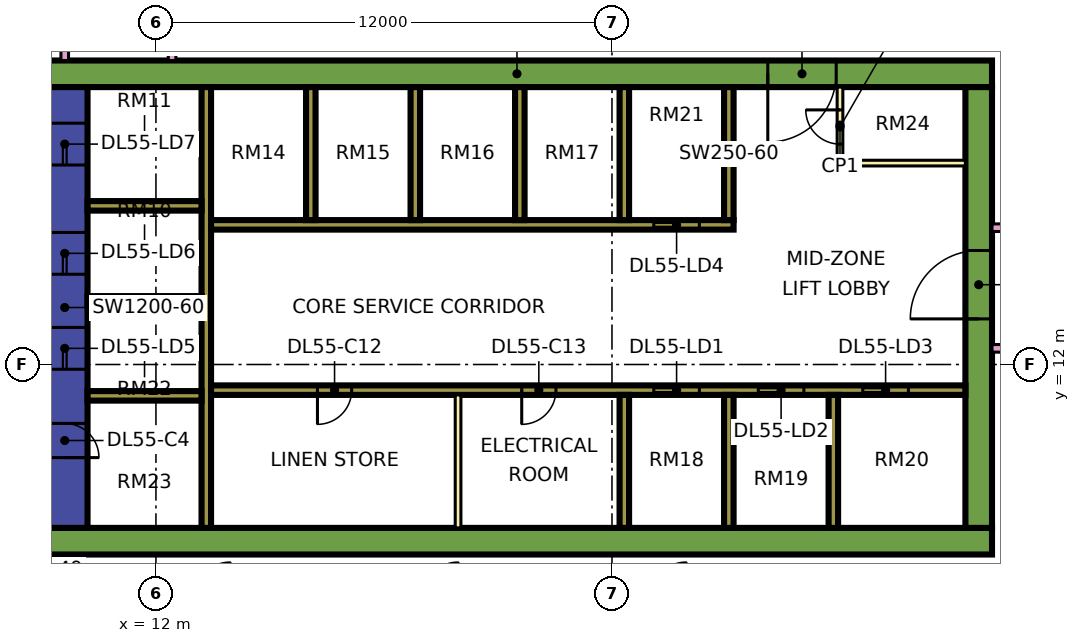
"""IFC4 building model, lengths in metres.
Left out: names, types, materials, properties, quantities, classifications, styles, units other than length and angle.
Written with IfcOpenShell. Run it as: python <this file> out.ifc"""

import sys

from ifc_helpers import new_model, si_unit, direction, frame, frame_2d, origin, place, context, subcontext, project, spatial, rectangle, extrude, element, fill, save


model = new_model("IFC4")
c1 = context("Model", 3, precision=1e-05, world=origin(), true_north=direction((0.0, 1.0)))
c2 = subcontext(c1, "Body", "Model", "MODEL_VIEW")
j1 = project(units=[si_unit("LENGTHUNIT", "METRE"), si_unit("PLANEANGLEUNIT", "RADIAN")], contexts=[c1])
p1 = place(None, origin())
s1 = spatial("IfcSite", under=j1, at=p1, CompositionType="ELEMENT")
p2 = place(p1, origin())
s2 = spatial("IfcBuilding", under=s1, at=p2, CompositionType="ELEMENT")
p3 = place(p2, frame((0.0, 0.0, 234.15)))
s3 = spatial("IfcBuildingStorey", under=s2, at=p3, CompositionType="ELEMENT", Elevation=234.15)
p4 = place(p3, frame((9.0, 7.35, 0.0), z_axis=(0.0, 0.0, 1.0), x_axis=(1.0, 0.0, 0.0)))
e1 = element("IfcWall", 1, at=p4, inside=s3, PredefinedType="SHEAR", context=c2, shape_type="SweptSolid", body=[
    extrude(rectangle(XDim=25.0, YDim=0.7, at=frame_2d((12.5, 0.0))), origin(), (0.0, 0.0, 1.0), 3.75),
])
p5 = place(p3, frame((9.0, 19.65, 0.0), z_axis=(0.0, 0.0, 1.0), x_axis=(1.0, 0.0, 0.0)))
e2 = element("IfcWall", 2, at=p5, inside=s3, PredefinedType="SHEAR", context=c2, shape_type="SweptSolid", body=[
    extrude(rectangle(XDim=25.0, YDim=0.7, at=frame_2d((12.5, 0.0))), origin(), (0.0, 0.0, 1.0), 3.75),
])
p6 = place(p5, frame((19.1, 0.0, 0.0)))
e3 = element("IfcOpeningElement", 3, at=p6, cuts=e2, PredefinedType="OPENING", context=c2, shape_type="SweptSolid", body=[
    extrude(rectangle(XDim=1.8, YDim=2.4, at=frame_2d((0.9, 1.2))), frame((0.0, 0.36, 0.0), z_axis=(0.0, -1.0, 0.0), x_axis=(1.0, 0.0, 0.0)), (0.0, 0.0, 1.0), 0.72),
])
p7 = place(p3, frame((9.6, 7.7, 0.0), z_axis=(0.0, 0.0, 1.0), x_axis=(0.0, 1.0, 0.0)))
e4 = element("IfcWall", 4, at=p7, inside=s3, PredefinedType="SHEAR", context=c2, shape_type="SweptSolid", body=[
    extrude(rectangle(XDim=11.6, YDim=1.2, at=frame_2d((5.8, 0.0))), origin(), (0.0, 0.0, 1.0), 3.75),
])
p8 = place(p7, frame((4.175, 0.0, 0.0)))
e5 = element("IfcOpeningElement", 5, at=p8, cuts=e4, PredefinedType="OPENING", context=c2, shape_type="SweptSolid", body=[
    extrude(rectangle(XDim=1.1, YDim=2.2, at=frame_2d((0.55, 1.1))), frame((0.0, 0.61, 0.0), z_axis=(0.0, -1.0, 0.0), x_axis=(1.0, 0.0, 0.0)), (0.0, 0.0, 1.0), 1.22),
])
p9 = place(p7, frame((6.675, 0.0, 0.0)))
e6 = element("IfcOpeningElement", 6, at=p9, cuts=e4, PredefinedType="OPENING", context=c2, shape_type="SweptSolid", body=[
    extrude(rectangle(XDim=1.1, YDim=2.2, at=frame_2d((0.55, 1.1))), frame((0.0, 0.61, 0.0), z_axis=(0.0, -1.0, 0.0), x_axis=(1.0, 0.0, 0.0)), (0.0, 0.0, 1.0), 1.22),
])
p10 = place(p7, frame((9.55, 0.0, 0.0)))
e7 = element("IfcOpeningElement", 7, at=p10, cuts=e4, PredefinedType="OPENING", context=c2, shape_type="SweptSolid", body=[
    extrude(rectangle(XDim=1.1, YDim=2.2, at=frame_2d((0.55, 1.1))), frame((0.0, 0.61, 0.0), z_axis=(0.0, -1.0, 0.0), x_axis=(1.0, 0.0, 0.0)), (0.0, 0.0, 1.0), 1.22),
])
p11 = place(p7, frame((1.85, 0.0, 0.0)))
e8 = element("IfcOpeningElement", 8, at=p11, cuts=e4, PredefinedType="OPENING", context=c2, shape_type="SweptSolid", body=[
    extrude(rectangle(XDim=0.9, YDim=2.1, at=frame_2d((0.45, 1.05))), frame((0.0, 0.61, 0.0), z_axis=(0.0, -1.0, 0.0), x_axis=(1.0, 0.0, 0.0)), (0.0, 0.0, 1.0), 1.22),
])
p12 = place(p3, frame((33.65, 7.7, 0.0), z_axis=(0.0, 0.0, 1.0), x_axis=(0.0, 1.0, 0.0)))
e9 = element("IfcWall", 9, at=p12, inside=s3, PredefinedType="SHEAR", context=c2, shape_type="SweptSolid", body=[
    extrude(rectangle(XDim=11.6, YDim=0.7, at=frame_2d((5.8, 0.0))), origin(), (0.0, 0.0, 1.0), 3.75),
])
p13 = place(p12, frame((5.5, 0.0, 0.0)))
e10 = element("IfcOpeningElement", 10, at=p13, cuts=e9, PredefinedType="OPENING", context=c2, shape_type="SweptSolid", body=[
    extrude(rectangle(XDim=1.8, YDim=2.4, at=frame_2d((0.9, 1.2))), frame((0.0, 0.36, 0.0), z_axis=(0.0, -1.0, 0.0), x_axis=(1.0, 0.0, 0.0)), (0.0, 0.0, 1.0), 0.72),
])
p14 = place(p3, frame((13.325, 7.7, 0.0), z_axis=(0.0, 0.0, 1.0), x_axis=(0.0, 1.0, 0.0)))
e11 = element("IfcWall", 11, at=p14, inside=s3, PredefinedType="SHEAR", context=c2, shape_type="SweptSolid", body=[
    extrude(rectangle(XDim=11.6, YDim=0.25, at=frame_2d((5.8, 0.0))), origin(), (0.0, 0.0, 1.0), 3.75),
])
p15 = place(p3, frame((13.45, 11.325, 0.0), z_axis=(0.0, 0.0, 1.0), x_axis=(1.0, 0.0, 0.0)))
e12 = element("IfcWall", 12, at=p15, inside=s3, PredefinedType="SHEAR", context=c2, shape_type="SweptSolid", body=[
    extrude(rectangle(XDim=19.85, YDim=0.25, at=frame_2d((9.925, 0.0))), origin(), (0.0, 0.0, 1.0), 3.75),
])
p16 = place(p15, frame((11.65, 0.0, 0.0)))
e13 = element("IfcOpeningElement", 13, at=p16, cuts=e12, PredefinedType="OPENING", context=c2, shape_type="SweptSolid", body=[
    extrude(rectangle(XDim=1.2, YDim=2.2, at=frame_2d((0.6, 1.1))), frame((0.0, 0.135, 0.0), z_axis=(0.0, -1.0, 0.0), x_axis=(1.0, 0.0, 0.0)), (0.0, 0.0, 1.0), 0.27),
])
p17 = place(p15, frame((14.4, 0.0, 0.0)))
e14 = element("IfcOpeningElement", 14, at=p17, cuts=e12, PredefinedType="OPENING", context=c2, shape_type="SweptSolid", body=[
    extrude(rectangle(XDim=1.2, YDim=2.2, at=frame_2d((0.6, 1.1))), frame((0.0, 0.135, 0.0), z_axis=(0.0, -1.0, 0.0), x_axis=(1.0, 0.0, 0.0)), (0.0, 0.0, 1.0), 0.27),
])
p18 = place(p15, frame((17.15, 0.0, 0.0)))
e15 = element("IfcOpeningElement", 15, at=p18, cuts=e12, PredefinedType="OPENING", context=c2, shape_type="SweptSolid", body=[
    extrude(rectangle(XDim=1.2, YDim=2.2, at=frame_2d((0.6, 1.1))), frame((0.0, 0.135, 0.0), z_axis=(0.0, -1.0, 0.0), x_axis=(1.0, 0.0, 0.0)), (0.0, 0.0, 1.0), 0.27),
])
p19 = place(p15, frame((2.8, 0.0, 0.0)))
e16 = element("IfcOpeningElement", 16, at=p19, cuts=e12, PredefinedType="OPENING", context=c2, shape_type="SweptSolid", body=[
    extrude(rectangle(XDim=0.9, YDim=2.1, at=frame_2d((0.45, 1.05))), frame((0.0, 0.135, 0.0), z_axis=(0.0, -1.0, 0.0), x_axis=(1.0, 0.0, 0.0)), (0.0, 0.0, 1.0), 0.27),
])
p20 = place(p15, frame((8.175, 0.0, 0.0)))
e17 = element("IfcOpeningElement", 17, at=p20, cuts=e12, PredefinedType="OPENING", context=c2, shape_type="SweptSolid", body=[
    extrude(rectangle(XDim=0.9, YDim=2.1, at=frame_2d((0.45, 1.05))), frame((0.0, 0.135, 0.0), z_axis=(0.0, -1.0, 0.0), x_axis=(1.0, 0.0, 0.0)), (0.0, 0.0, 1.0), 0.27),
])
p21 = place(p3, frame((13.45, 15.675, 0.0), z_axis=(0.0, 0.0, 1.0), x_axis=(1.0, 0.0, 0.0)))
e18 = element("IfcWall", 18, at=p21, inside=s3, PredefinedType="SHEAR", context=c2, shape_type="SweptSolid", body=[
    extrude(rectangle(XDim=13.75, YDim=0.25, at=frame_2d((6.875, 0.0))), origin(), (0.0, 0.0, 1.0), 3.75),
])
p22 = place(p21, frame((11.65, 0.0, 0.0)))
e19 = element("IfcOpeningElement", 19, at=p22, cuts=e18, PredefinedType="OPENING", context=c2, shape_type="SweptSolid", body=[
    extrude(rectangle(XDim=1.2, YDim=2.2, at=frame_2d((0.6, 1.1))), frame((0.0, 0.135, 0.0), z_axis=(0.0, -1.0, 0.0), x_axis=(1.0, 0.0, 0.0)), (0.0, 0.0, 1.0), 0.27),
])
for number, where, z_axis, x_axis in (
    (20, (10.2, 11.175, 0.0), (0.0, 0.0, 1.0), (1.0, 0.0, 0.0)),
    (21, (10.2, 13.675, 0.0), (0.0, 0.0, 1.0), (1.0, 0.0, 0.0)),
    (22, (10.2, 16.175, 0.0), (0.0, 0.0, 1.0), (1.0, 0.0, 0.0)),
):
    element("IfcWall", number, at=place(p3, frame(where, z_axis=z_axis, x_axis=x_axis)), inside=s3, PredefinedType="SHEAR", context=c2, shape_type="SweptSolid", body=[
        extrude(rectangle(XDim=3.0, YDim=0.25, at=frame_2d((1.5, 0.0))), origin(), (0.0, 0.0, 1.0), 3.75),
    ])
for number, where, z_axis, x_axis in (
    (23, (24.325, 7.7, 0.0), (0.0, 0.0, 1.0), (0.0, 1.0, 0.0)),
    (24, (27.075, 7.7, 0.0), (0.0, 0.0, 1.0), (0.0, 1.0, 0.0)),
    (25, (29.825, 7.7, 0.0), (0.0, 0.0, 1.0), (0.0, 1.0, 0.0)),
    (26, (16.075, 15.8, 0.0), (0.0, 0.0, 1.0), (0.0, 1.0, 0.0)),
    (27, (18.825, 15.8, 0.0), (0.0, 0.0, 1.0), (0.0, 1.0, 0.0)),
    (28, (21.575, 15.8, 0.0), (0.0, 0.0, 1.0), (0.0, 1.0, 0.0)),
    (29, (24.325, 15.8, 0.0), (0.0, 0.0, 1.0), (0.0, 1.0, 0.0)),
    (30, (27.075, 15.8, 0.0), (0.0, 0.0, 1.0), (0.0, 1.0, 0.0)),
):
    element("IfcWall", number, at=place(p3, frame(where, z_axis=z_axis, x_axis=x_axis)), inside=s3, PredefinedType="SHEAR", context=c2, shape_type="SweptSolid", body=[
        extrude(rectangle(XDim=3.5, YDim=0.25, at=frame_2d((1.75, 0.0))), origin(), (0.0, 0.0, 1.0), 3.75),
    ])
p23 = place(p3, frame((-1.447, 12.553, 0.0), z_axis=(0.0, 0.0, 1.0), x_axis=(0.707106781187, -0.707106781187, 0.0)))
e31 = element("IfcWall", 31, at=p23, inside=s3, PredefinedType="SOLIDWALL", context=c2, shape_type="SweptSolid", body=[
    extrude(rectangle(XDim=19.799, YDim=0.15, at=frame_2d((9.899, 0.0))), origin(), (0.0, 0.0, 1.0), 3.35),
])
p24 = place(p23, frame((2.212, 0.0, 0.45)))
e32 = element("IfcOpeningElement", 32, at=p24, cuts=e31, PredefinedType="OPENING", context=c2, shape_type="SweptSolid", body=[
    extrude(rectangle(XDim=3.0, YDim=2.4, at=frame_2d((1.5, 1.2))), frame((0.0, 0.085, 0.0), z_axis=(0.0, -1.0, 0.0), x_axis=(1.0, 0.0, 0.0)), (0.0, 0.0, 1.0), 0.17),
])
p25 = place(p23, frame((10.216, 0.0, 0.45)))
e33 = element("IfcOpeningElement", 33, at=p25, cuts=e31, PredefinedType="OPENING", context=c2, shape_type="SweptSolid", body=[
    extrude(rectangle(XDim=3.0, YDim=2.4, at=frame_2d((1.5, 1.2))), frame((0.0, 0.085, 0.0), z_axis=(0.0, -1.0, 0.0), x_axis=(1.0, 0.0, 0.0)), (0.0, 0.0, 1.0), 0.17),
])
p26 = place(p3, frame((19.95, 7.7, 0.0), z_axis=(0.0, 0.0, 1.0), x_axis=(0.0, 1.0, 0.0)))
e34 = element("IfcWall", 34, at=p26, inside=s3, PredefinedType="PARTITIONING", context=c2, shape_type="SweptSolid", body=[
    extrude(rectangle(XDim=3.5, YDim=0.15, at=frame_2d((1.75, 0.0))), origin(), (0.0, 0.0, 1.0), 3.35),
])
p27 = place(p3, frame((30.0, 17.3, 0.0), z_axis=(0.0, 0.0, 1.0), x_axis=(0.0, 1.0, 0.0)))
e35 = element("IfcWall", 35, at=p27, inside=s3, PredefinedType="PARTITIONING", context=c2, shape_type="SweptSolid", body=[
    extrude(rectangle(XDim=2.0, YDim=0.15, at=frame_2d((1.0, 0.0))), origin(), (0.0, 0.0, 1.0), 3.35),
])
p28 = place(p27, frame((0.5, 0.0, 0.0)))
e36 = element("IfcOpeningElement", 36, at=p28, cuts=e35, PredefinedType="OPENING", context=c2, shape_type="SweptSolid", body=[
    extrude(rectangle(XDim=0.9, YDim=2.1, at=frame_2d((0.45, 1.05))), frame((0.0, 0.085, 0.0), z_axis=(0.0, -1.0, 0.0), x_axis=(1.0, 0.0, 0.0)), (0.0, 0.0, 1.0), 0.17),
])
p29 = place(p3, frame((30.0, 17.3, 0.0), z_axis=(0.0, 0.0, 1.0), x_axis=(1.0, 0.0, 0.0)))
e37 = element("IfcWall", 37, at=p29, inside=s3, PredefinedType="PARTITIONING", context=c2, shape_type="SweptSolid", body=[
    extrude(rectangle(XDim=3.3, YDim=0.15, at=frame_2d((1.65, 0.0))), origin(), (0.0, 0.0, 1.0), 3.35),
])
p30 = place(p3, frame((9.6, 20.0, 0.0), z_axis=(0.0, 0.0, 1.0), x_axis=(0.0, 1.0, 0.0)))
e38 = element("IfcWall", 38, at=p30, inside=s3, PredefinedType="PARTITIONING", context=c2, shape_type="SweptSolid", body=[
    extrude(rectangle(XDim=42.926, YDim=0.2, at=frame_2d((21.463, 0.0))), origin(), (0.0, 0.0, 1.0), 3.35),
])
p31 = place(p30, frame((28.95, 0.0, 0.0)))
e39 = element("IfcOpeningElement", 39, at=p31, cuts=e38, PredefinedType="OPENING", context=c2, shape_type="SweptSolid", body=[
    extrude(rectangle(XDim=1.0, YDim=2.1, at=frame_2d((0.5, 1.05))), frame((0.0, 0.11, 0.0), z_axis=(0.0, -1.0, 0.0), x_axis=(1.0, 0.0, 0.0)), (0.0, 0.0, 1.0), 0.22),
])
p32 = place(p30, frame((31.95, 0.0, 0.0)))
e40 = element("IfcOpeningElement", 40, at=p32, cuts=e38, PredefinedType="OPENING", context=c2, shape_type="SweptSolid", body=[
    extrude(rectangle(XDim=1.0, YDim=2.1, at=frame_2d((0.5, 1.05))), frame((0.0, 0.11, 0.0), z_axis=(0.0, -1.0, 0.0), x_axis=(1.0, 0.0, 0.0)), (0.0, 0.0, 1.0), 0.22),
])
p33 = place(p30, frame((0.6, 0.0, 0.0)))
e41 = element("IfcOpeningElement", 41, at=p33, cuts=e38, PredefinedType="OPENING", context=c2, shape_type="SweptSolid", body=[
    extrude(rectangle(XDim=1.2, YDim=2.1, at=frame_2d((0.6, 1.05))), frame((0.0, 0.11, 0.0), z_axis=(0.0, -1.0, 0.0), x_axis=(1.0, 0.0, 0.0)), (0.0, 0.0, 1.0), 0.22),
])
p34 = place(p30, frame((11.25, 0.0, 0.0)))
e42 = element("IfcOpeningElement", 42, at=p34, cuts=e38, PredefinedType="OPENING", context=c2, shape_type="SweptSolid", body=[
    extrude(rectangle(XDim=1.0, YDim=2.1, at=frame_2d((0.5, 1.05))), frame((0.0, 0.11, 0.0), z_axis=(0.0, -1.0, 0.0), x_axis=(1.0, 0.0, 0.0)), (0.0, 0.0, 1.0), 0.22),
])
p35 = place(p3, frame((12.425, 20.0, 0.0), z_axis=(0.0, 0.0, 1.0), x_axis=(0.0, 1.0, 0.0)))
e43 = element("IfcWall", 43, at=p35, inside=s3, PredefinedType="PARTITIONING", context=c2, shape_type="SweptSolid", body=[
    extrude(rectangle(XDim=43.0, YDim=0.2, at=frame_2d((21.5, 0.0))), origin(), (0.0, 0.0, 1.0), 3.35),
])
p36 = place(p35, frame((5.95, 0.0, 0.0)))
e44 = element("IfcOpeningElement", 44, at=p36, cuts=e43, PredefinedType="OPENING", context=c2, shape_type="SweptSolid", body=[
    extrude(rectangle(XDim=1.0, YDim=2.1, at=frame_2d((0.5, 1.05))), frame((0.0, 0.11, 0.0), z_axis=(0.0, -1.0, 0.0), x_axis=(1.0, 0.0, 0.0)), (0.0, 0.0, 1.0), 0.22),
])
p37 = place(p35, frame((12.0, 0.0, 0.0)))
e45 = element("IfcOpeningElement", 45, at=p37, cuts=e43, PredefinedType="OPENING", context=c2, shape_type="SweptSolid", body=[
    extrude(rectangle(XDim=1.0, YDim=2.1, at=frame_2d((0.5, 1.05))), frame((0.0, 0.11, 0.0), z_axis=(0.0, -1.0, 0.0), x_axis=(1.0, 0.0, 0.0)), (0.0, 0.0, 1.0), 0.22),
])
p38 = place(p35, frame((16.9, 0.0, 0.0)))
e46 = element("IfcOpeningElement", 46, at=p38, cuts=e43, PredefinedType="OPENING", context=c2, shape_type="SweptSolid", body=[
    extrude(rectangle(XDim=1.0, YDim=2.1, at=frame_2d((0.5, 1.05))), frame((0.0, 0.11, 0.0), z_axis=(0.0, -1.0, 0.0), x_axis=(1.0, 0.0, 0.0)), (0.0, 0.0, 1.0), 0.22),
])
p39 = place(p35, frame((41.05, 0.0, 0.0)))
e47 = element("IfcOpeningElement", 47, at=p39, cuts=e43, PredefinedType="OPENING", context=c2, shape_type="SweptSolid", body=[
    extrude(rectangle(XDim=1.0, YDim=2.1, at=frame_2d((0.5, 1.05))), frame((0.0, 0.11, 0.0), z_axis=(0.0, -1.0, 0.0), x_axis=(1.0, 0.0, 0.0)), (0.0, 0.0, 1.0), 0.22),
])
p40 = place(p35, frame((1.15, 0.0, 0.0)))
e48 = element("IfcOpeningElement", 48, at=p40, cuts=e43, PredefinedType="OPENING", context=c2, shape_type="SweptSolid", body=[
    extrude(rectangle(XDim=1.8, YDim=2.1, at=frame_2d((0.9, 1.05))), frame((0.0, 0.11, 0.0), z_axis=(0.0, -1.0, 0.0), x_axis=(1.0, 0.0, 0.0)), (0.0, 0.0, 1.0), 0.22),
])
p41 = place(p35, frame((28.6, 0.0, 0.0)))
e49 = element("IfcOpeningElement", 49, at=p41, cuts=e43, PredefinedType="OPENING", context=c2, shape_type="SweptSolid", body=[
    extrude(rectangle(XDim=1.8, YDim=2.1, at=frame_2d((0.9, 1.05))), frame((0.0, 0.11, 0.0), z_axis=(0.0, -1.0, 0.0), x_axis=(1.0, 0.0, 0.0)), (0.0, 0.0, 1.0), 0.22),
])
p42 = place(p3, frame((34.0, 12.425, 0.0), z_axis=(0.0, 0.0, 1.0), x_axis=(1.0, 0.0, 0.0)))
e50 = element("IfcWall", 50, at=p42, inside=s3, PredefinedType="PARTITIONING", context=c2, shape_type="SweptSolid", body=[
    extrude(rectangle(XDim=2.426, YDim=0.2, at=frame_2d((1.213, 0.0))), origin(), (0.0, 0.0, 1.0), 3.35),
])
p43 = place(p3, frame((34.0, 15.6, 0.0), z_axis=(0.0, 0.0, 1.0), x_axis=(1.0, 0.0, 0.0)))
e51 = element("IfcWall", 51, at=p43, inside=s3, PredefinedType="PARTITIONING", context=c2, shape_type="SweptSolid", body=[
    extrude(rectangle(XDim=10.35, YDim=0.2, at=frame_2d((5.175, 0.0))), origin(), (0.0, 0.0, 1.0), 3.35),
])
p44 = place(p43, frame((5.6, 0.0, 0.0)))
e52 = element("IfcOpeningElement", 52, at=p44, cuts=e51, PredefinedType="OPENING", context=c2, shape_type="SweptSolid", body=[
    extrude(rectangle(XDim=1.0, YDim=2.1, at=frame_2d((0.5, 1.05))), frame((0.0, 0.11, 0.0), z_axis=(0.0, -1.0, 0.0), x_axis=(1.0, 0.0, 0.0)), (0.0, 0.0, 1.0), 0.22),
])
p45 = place(p43, frame((0.45, 0.0, 0.0)))
e53 = element("IfcOpeningElement", 53, at=p45, cuts=e51, PredefinedType="OPENING", context=c2, shape_type="SweptSolid", body=[
    extrude(rectangle(XDim=1.2, YDim=2.1, at=frame_2d((0.6, 1.05))), frame((0.0, 0.11, 0.0), z_axis=(0.0, -1.0, 0.0), x_axis=(1.0, 0.0, 0.0)), (0.0, 0.0, 1.0), 0.22),
])
p46 = place(p16, origin())
e54 = element("IfcDoor", 54, at=p46, inside=s3, OperationType="DOUBLE_DOOR_SLIDING", PredefinedType="DOOR", context=c2, shape_type="SweptSolid", body=[
    extrude(rectangle(XDim=1.2, YDim=2.2, at=frame_2d((0.6, 1.1))), frame((0.0, 0.025, 0.0), z_axis=(0.0, -1.0, 0.0), x_axis=(1.0, 0.0, 0.0)), (0.0, 0.0, 1.0), 0.05),
])
fill(e13, e54)
p47 = place(p17, origin())
e55 = element("IfcDoor", 55, at=p47, inside=s3, OperationType="DOUBLE_DOOR_SLIDING", PredefinedType="DOOR", context=c2, shape_type="SweptSolid", body=[
    extrude(rectangle(XDim=1.2, YDim=2.2, at=frame_2d((0.6, 1.1))), frame((0.0, 0.025, 0.0), z_axis=(0.0, -1.0, 0.0), x_axis=(1.0, 0.0, 0.0)), (0.0, 0.0, 1.0), 0.05),
])
fill(e14, e55)
p48 = place(p18, origin())
e56 = element("IfcDoor", 56, at=p48, inside=s3, OperationType="DOUBLE_DOOR_SLIDING", PredefinedType="DOOR", context=c2, shape_type="SweptSolid", body=[
    extrude(rectangle(XDim=1.2, YDim=2.2, at=frame_2d((0.6, 1.1))), frame((0.0, 0.025, 0.0), z_axis=(0.0, -1.0, 0.0), x_axis=(1.0, 0.0, 0.0)), (0.0, 0.0, 1.0), 0.05),
])
fill(e15, e56)
p49 = place(p22, origin())
e57 = element("IfcDoor", 57, at=p49, inside=s3, OperationType="DOUBLE_DOOR_SLIDING", PredefinedType="DOOR", context=c2, shape_type="SweptSolid", body=[
    extrude(rectangle(XDim=1.2, YDim=2.2, at=frame_2d((0.6, 1.1))), frame((0.0, 0.025, 0.0), z_axis=(0.0, -1.0, 0.0), x_axis=(1.0, 0.0, 0.0)), (0.0, 0.0, 1.0), 0.05),
])
fill(e19, e57)
p50 = place(p8, origin())
e58 = element("IfcDoor", 58, at=p50, inside=s3, OperationType="DOUBLE_DOOR_SLIDING", PredefinedType="DOOR", context=c2, shape_type="SweptSolid", body=[
    extrude(rectangle(XDim=1.1, YDim=2.2, at=frame_2d((0.55, 1.1))), frame((0.0, 0.025, 0.0), z_axis=(0.0, -1.0, 0.0), x_axis=(1.0, 0.0, 0.0)), (0.0, 0.0, 1.0), 0.05),
])
fill(e5, e58)
p51 = place(p9, origin())
e59 = element("IfcDoor", 59, at=p51, inside=s3, OperationType="DOUBLE_DOOR_SLIDING", PredefinedType="DOOR", context=c2, shape_type="SweptSolid", body=[
    extrude(rectangle(XDim=1.1, YDim=2.2, at=frame_2d((0.55, 1.1))), frame((0.0, 0.025, 0.0), z_axis=(0.0, -1.0, 0.0), x_axis=(1.0, 0.0, 0.0)), (0.0, 0.0, 1.0), 0.05),
])
fill(e6, e59)
p52 = place(p10, origin())
e60 = element("IfcDoor", 60, at=p52, inside=s3, OperationType="DOUBLE_DOOR_SLIDING", PredefinedType="DOOR", context=c2, shape_type="SweptSolid", body=[
    extrude(rectangle(XDim=1.1, YDim=2.2, at=frame_2d((0.55, 1.1))), frame((0.0, 0.025, 0.0), z_axis=(0.0, -1.0, 0.0), x_axis=(1.0, 0.0, 0.0)), (0.0, 0.0, 1.0), 0.05),
])
fill(e7, e60)
p53 = place(p13, origin())
e61 = element("IfcDoor", 61, at=p53, inside=s3, OperationType="DOUBLE_DOOR_SINGLE_SWING", PredefinedType="DOOR", context=c2, shape_type="SweptSolid", body=[
    extrude(rectangle(XDim=1.8, YDim=2.4, at=frame_2d((0.9, 1.2))), frame((0.0, 0.025, 0.0), z_axis=(0.0, -1.0, 0.0), x_axis=(1.0, 0.0, 0.0)), (0.0, 0.0, 1.0), 0.05),
])
fill(e10, e61)
p54 = place(p6, frame((1.8, 0.0, 0.0), z_axis=(0.0, 0.0, 1.0), x_axis=(-1.0, 0.0, 0.0)))
e62 = element("IfcDoor", 62, at=p54, inside=s3, OperationType="DOUBLE_DOOR_SINGLE_SWING", PredefinedType="DOOR", context=c2, shape_type="SweptSolid", body=[
    extrude(rectangle(XDim=1.8, YDim=2.4, at=frame_2d((0.9, 1.2))), frame((0.0, 0.025, 0.0), z_axis=(0.0, -1.0, 0.0), x_axis=(1.0, 0.0, 0.0)), (0.0, 0.0, 1.0), 0.05),
])
fill(e3, e62)
p55 = place(p11, frame((0.9, 0.0, 0.0), z_axis=(0.0, 0.0, 1.0), x_axis=(-1.0, 0.0, 0.0)))
e63 = element("IfcDoor", 63, at=p55, inside=s3, OperationType="SINGLE_SWING_LEFT", PredefinedType="DOOR", context=c2, shape_type="SweptSolid", body=[
    extrude(rectangle(XDim=0.9, YDim=2.1, at=frame_2d((0.45, 1.05))), frame((0.0, 0.025, 0.0), z_axis=(0.0, -1.0, 0.0), x_axis=(1.0, 0.0, 0.0)), (0.0, 0.0, 1.0), 0.05),
])
fill(e8, e63)
p56 = place(p19, frame((0.9, 0.0, 0.0), z_axis=(0.0, 0.0, 1.0), x_axis=(-1.0, 0.0, 0.0)))
e64 = element("IfcDoor", 64, at=p56, inside=s3, OperationType="SINGLE_SWING_LEFT", PredefinedType="DOOR", context=c2, shape_type="SweptSolid", body=[
    extrude(rectangle(XDim=0.9, YDim=2.1, at=frame_2d((0.45, 1.05))), frame((0.0, 0.025, 0.0), z_axis=(0.0, -1.0, 0.0), x_axis=(1.0, 0.0, 0.0)), (0.0, 0.0, 1.0), 0.05),
])
fill(e16, e64)
p57 = place(p20, frame((0.9, 0.0, 0.0), z_axis=(0.0, 0.0, 1.0), x_axis=(-1.0, 0.0, 0.0)))
e65 = element("IfcDoor", 65, at=p57, inside=s3, OperationType="SINGLE_SWING_LEFT", PredefinedType="DOOR", context=c2, shape_type="SweptSolid", body=[
    extrude(rectangle(XDim=0.9, YDim=2.1, at=frame_2d((0.45, 1.05))), frame((0.0, 0.025, 0.0), z_axis=(0.0, -1.0, 0.0), x_axis=(1.0, 0.0, 0.0)), (0.0, 0.0, 1.0), 0.05),
])
fill(e17, e65)
p58 = place(p28, frame((0.9, 0.0, 0.0), z_axis=(0.0, 0.0, 1.0), x_axis=(-1.0, 0.0, 0.0)))
e66 = element("IfcDoor", 66, at=p58, inside=s3, OperationType="SINGLE_SWING_RIGHT", PredefinedType="DOOR", context=c2, shape_type="SweptSolid", body=[
    extrude(rectangle(XDim=0.9, YDim=2.1, at=frame_2d((0.45, 1.05))), frame((0.0, 0.025, 0.0), z_axis=(0.0, -1.0, 0.0), x_axis=(1.0, 0.0, 0.0)), (0.0, 0.0, 1.0), 0.05),
])
fill(e36, e66)
save(model, sys.argv[1])
